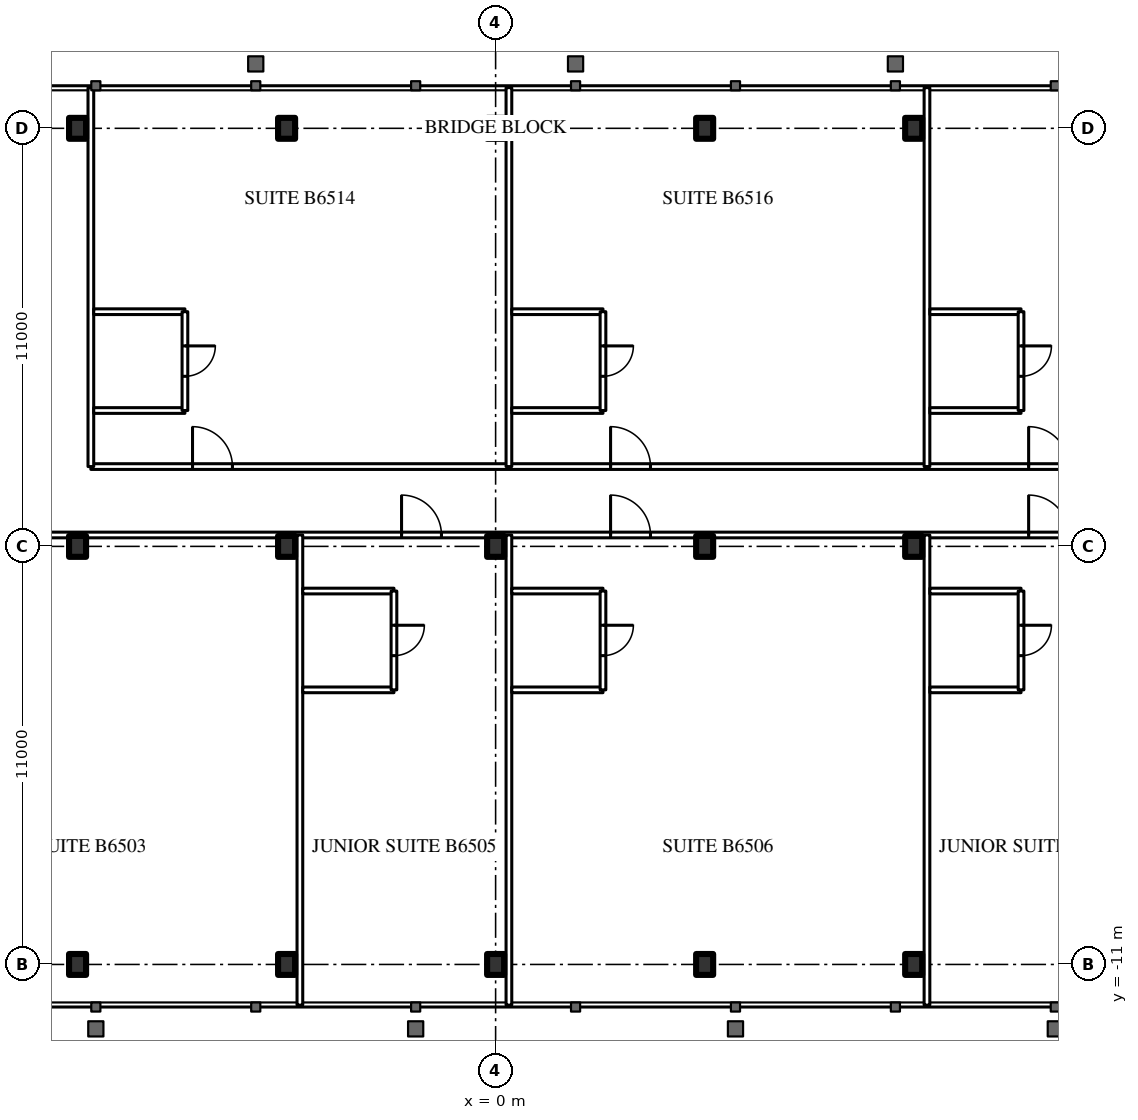
"""IFC4 building model, lengths in metres.
Left out: names, types, materials, properties, quantities, classifications, styles, units other than length and angle.
Written with IfcOpenShell. Run it as: python <this file> out.ifc"""

import sys

from ifc_helpers import new_model, si_unit, direction, frame, frame_2d, origin, origin_2d, place, context, subcontext, project, spatial, rectangle, i_section, extrude, element, fill, save


model = new_model("IFC4")
c1 = context("Model", 3, precision=1e-05, world=origin(), true_north=direction((0.0, 1.0)))
c2 = subcontext(c1, "Body", "Model", "MODEL_VIEW")
j1 = project(units=[si_unit("LENGTHUNIT", "METRE"), si_unit("PLANEANGLEUNIT", "RADIAN")], contexts=[c1])
p1 = place(None, origin())
s1 = spatial("IfcSite", under=j1, at=p1, CompositionType="ELEMENT")
p2 = place(p1, origin())
s2 = spatial("IfcBuilding", under=s1, at=p2, CompositionType="ELEMENT")
p3 = place(p2, frame((0.0, 0.0, 244.1)))
s3 = spatial("IfcBuildingStorey", under=s2, at=p3, CompositionType="ELEMENT", Elevation=244.1)
for number, where, z_axis, x_axis in (
    (1, (-11.0, -11.0, 0.0), (0.0, 0.0, 1.0), (1.0, 0.0, 0.0)),
    (2, (-5.5, -11.0, 0.0), (0.0, 0.0, 1.0), (1.0, 0.0, 0.0)),
    (3, (0.0, -11.0, 0.0), (0.0, 0.0, 1.0), (1.0, 0.0, 0.0)),
    (4, (5.5, -11.0, 0.0), (0.0, 0.0, 1.0), (1.0, 0.0, 0.0)),
    (5, (11.0, -11.0, 0.0), (0.0, 0.0, 1.0), (1.0, 0.0, 0.0)),
    (6, (-11.0, 0.0, 0.0), (0.0, 0.0, 1.0), (1.0, 0.0, 0.0)),
    (7, (-5.5, 0.0, 0.0), (0.0, 0.0, 1.0), (1.0, 0.0, 0.0)),
    (8, (0.0, 0.0, 0.0), (0.0, 0.0, 1.0), (1.0, 0.0, 0.0)),
    (9, (5.5, 0.0, 0.0), (0.0, 0.0, 1.0), (1.0, 0.0, 0.0)),
    (10, (11.0, 0.0, 0.0), (0.0, 0.0, 1.0), (1.0, 0.0, 0.0)),
    (11, (-11.0, 11.0, 0.0), (0.0, 0.0, 1.0), (1.0, 0.0, 0.0)),
    (12, (-5.5, 11.0, 0.0), (0.0, 0.0, 1.0), (1.0, 0.0, 0.0)),
    (13, (0.0, 11.0, 0.0), (0.0, 0.0, 1.0), (1.0, 0.0, 0.0)),
    (14, (5.5, 11.0, 0.0), (0.0, 0.0, 1.0), (1.0, 0.0, 0.0)),
    (15, (11.0, 11.0, 0.0), (0.0, 0.0, 1.0), (1.0, 0.0, 0.0)),
):
    element("IfcColumn", number, at=place(p3, frame(where, z_axis=z_axis, x_axis=x_axis)), inside=s3, PredefinedType="COLUMN", context=c2, shape_type="SweptSolid", body=[
        extrude(i_section(OverallWidth=0.448, OverallDepth=0.55, WebThickness=0.072, FlangeThickness=0.115, FilletRadius=0.02, at=origin_2d()), origin(), (0.0, 0.0, 1.0), 3.6),
    ])
p4 = place(p3, frame((-27.5, 0.3, 0.0), z_axis=(0.0, 0.0, 1.0), x_axis=(1.0, 0.0, 0.0)))
e16 = element("IfcWall", 16, at=p4, inside=s3, PredefinedType="PARTITIONING", context=c2, shape_type="SweptSolid", body=[
    extrude(rectangle(XDim=55.0, YDim=0.15, at=frame_2d((27.5, 0.0))), origin(), (0.0, 0.0, 1.0), 2.4),
])
p5 = place(p4, frame((1.575, 0.0, 0.0)))
e17 = element("IfcOpeningElement", 17, at=p5, cuts=e16, PredefinedType="OPENING", context=c2, shape_type="SweptSolid", body=[
    extrude(rectangle(XDim=1.0, YDim=2.2, at=frame_2d((0.5, 1.1))), frame((0.0, 0.085, 0.0), z_axis=(0.0, -1.0, 0.0), x_axis=(1.0, 0.0, 0.0)), (0.0, 0.0, 1.0), 0.17),
])
p6 = place(p4, frame((8.525, 0.0, 0.0)))
e18 = element("IfcOpeningElement", 18, at=p6, cuts=e16, PredefinedType="OPENING", context=c2, shape_type="SweptSolid", body=[
    extrude(rectangle(XDim=1.05, YDim=2.4, at=frame_2d((0.525, 1.2))), frame((0.0, 0.085, 0.0), z_axis=(0.0, -1.0, 0.0), x_axis=(1.0, 0.0, 0.0)), (0.0, 0.0, 1.0), 0.17),
])
p7 = place(p4, frame((14.025, 0.0, 0.0)))
e19 = element("IfcOpeningElement", 19, at=p7, cuts=e16, PredefinedType="OPENING", context=c2, shape_type="SweptSolid", body=[
    extrude(rectangle(XDim=1.05, YDim=2.4, at=frame_2d((0.525, 1.2))), frame((0.0, 0.085, 0.0), z_axis=(0.0, -1.0, 0.0), x_axis=(1.0, 0.0, 0.0)), (0.0, 0.0, 1.0), 0.17),
])
p8 = place(p4, frame((25.025, 0.0, 0.0)))
e20 = element("IfcOpeningElement", 20, at=p8, cuts=e16, PredefinedType="OPENING", context=c2, shape_type="SweptSolid", body=[
    extrude(rectangle(XDim=1.05, YDim=2.4, at=frame_2d((0.525, 1.2))), frame((0.0, 0.085, 0.0), z_axis=(0.0, -1.0, 0.0), x_axis=(1.0, 0.0, 0.0)), (0.0, 0.0, 1.0), 0.17),
])
p9 = place(p4, frame((30.525, 0.0, 0.0)))
e21 = element("IfcOpeningElement", 21, at=p9, cuts=e16, PredefinedType="OPENING", context=c2, shape_type="SweptSolid", body=[
    extrude(rectangle(XDim=1.05, YDim=2.4, at=frame_2d((0.525, 1.2))), frame((0.0, 0.085, 0.0), z_axis=(0.0, -1.0, 0.0), x_axis=(1.0, 0.0, 0.0)), (0.0, 0.0, 1.0), 0.17),
])
p10 = place(p4, frame((41.525, 0.0, 0.0)))
e22 = element("IfcOpeningElement", 22, at=p10, cuts=e16, PredefinedType="OPENING", context=c2, shape_type="SweptSolid", body=[
    extrude(rectangle(XDim=1.05, YDim=2.4, at=frame_2d((0.525, 1.2))), frame((0.0, 0.085, 0.0), z_axis=(0.0, -1.0, 0.0), x_axis=(1.0, 0.0, 0.0)), (0.0, 0.0, 1.0), 0.17),
])
p11 = place(p4, frame((47.025, 0.0, 0.0)))
e23 = element("IfcOpeningElement", 23, at=p11, cuts=e16, PredefinedType="OPENING", context=c2, shape_type="SweptSolid", body=[
    extrude(rectangle(XDim=1.05, YDim=2.4, at=frame_2d((0.525, 1.2))), frame((0.0, 0.085, 0.0), z_axis=(0.0, -1.0, 0.0), x_axis=(1.0, 0.0, 0.0)), (0.0, 0.0, 1.0), 0.17),
])
p12 = place(p4, frame((52.525, 0.0, 0.0)))
e24 = element("IfcOpeningElement", 24, at=p12, cuts=e16, PredefinedType="OPENING", context=c2, shape_type="SweptSolid", body=[
    extrude(rectangle(XDim=1.05, YDim=2.4, at=frame_2d((0.525, 1.2))), frame((0.0, 0.085, 0.0), z_axis=(0.0, -1.0, 0.0), x_axis=(1.0, 0.0, 0.0)), (0.0, 0.0, 1.0), 0.17),
])
p13 = place(p3, frame((-10.65, 2.1, 0.0), z_axis=(0.0, 0.0, 1.0), x_axis=(1.0, 0.0, 0.0)))
e25 = element("IfcWall", 25, at=p13, inside=s3, PredefinedType="PARTITIONING", context=c2, shape_type="SweptSolid", body=[
    extrude(rectangle(XDim=38.15, YDim=0.15, at=frame_2d((19.075, 0.0))), origin(), (0.0, 0.0, 1.0), 3.4),
])
p14 = place(p13, frame((2.675, 0.0, 0.0)))
e26 = element("IfcOpeningElement", 26, at=p14, cuts=e25, PredefinedType="OPENING", context=c2, shape_type="SweptSolid", body=[
    extrude(rectangle(XDim=1.05, YDim=2.4, at=frame_2d((0.525, 1.2))), frame((0.0, 0.085, 0.0), z_axis=(0.0, -1.0, 0.0), x_axis=(1.0, 0.0, 0.0)), (0.0, 0.0, 1.0), 0.17),
])
p15 = place(p13, frame((13.675, 0.0, 0.0)))
e27 = element("IfcOpeningElement", 27, at=p15, cuts=e25, PredefinedType="OPENING", context=c2, shape_type="SweptSolid", body=[
    extrude(rectangle(XDim=1.05, YDim=2.4, at=frame_2d((0.525, 1.2))), frame((0.0, 0.085, 0.0), z_axis=(0.0, -1.0, 0.0), x_axis=(1.0, 0.0, 0.0)), (0.0, 0.0, 1.0), 0.17),
])
p16 = place(p13, frame((24.675, 0.0, 0.0)))
e28 = element("IfcOpeningElement", 28, at=p16, cuts=e25, PredefinedType="OPENING", context=c2, shape_type="SweptSolid", body=[
    extrude(rectangle(XDim=1.05, YDim=2.4, at=frame_2d((0.525, 1.2))), frame((0.0, 0.085, 0.0), z_axis=(0.0, -1.0, 0.0), x_axis=(1.0, 0.0, 0.0)), (0.0, 0.0, 1.0), 0.17),
])
p17 = place(p13, frame((30.175, 0.0, 0.0)))
e29 = element("IfcOpeningElement", 29, at=p17, cuts=e25, PredefinedType="OPENING", context=c2, shape_type="SweptSolid", body=[
    extrude(rectangle(XDim=1.05, YDim=2.4, at=frame_2d((0.525, 1.2))), frame((0.0, 0.085, 0.0), z_axis=(0.0, -1.0, 0.0), x_axis=(1.0, 0.0, 0.0)), (0.0, 0.0, 1.0), 0.17),
])
p18 = place(p13, frame((35.675, 0.0, 0.0)))
e30 = element("IfcOpeningElement", 30, at=p18, cuts=e25, PredefinedType="OPENING", context=c2, shape_type="SweptSolid", body=[
    extrude(rectangle(XDim=1.05, YDim=2.4, at=frame_2d((0.525, 1.2))), frame((0.0, 0.085, 0.0), z_axis=(0.0, -1.0, 0.0), x_axis=(1.0, 0.0, 0.0)), (0.0, 0.0, 1.0), 0.17),
])
for number, where, z_axis, x_axis in (
    (31, (-5.15, -12.07, 0.0), (0.0, 0.0, 1.0), (0.0, 1.0, 0.0)),
    (32, (0.35, -12.07, 0.0), (0.0, 0.0, 1.0), (0.0, 1.0, 0.0)),
    (33, (11.35, -12.07, 0.0), (0.0, 0.0, 1.0), (0.0, 1.0, 0.0)),
):
    element("IfcWall", number, at=place(p3, frame(where, z_axis=z_axis, x_axis=x_axis)), inside=s3, PredefinedType="PARTITIONING", context=c2, shape_type="SweptSolid", body=[
        extrude(rectangle(XDim=12.37, YDim=0.15, at=frame_2d((6.185, 0.0))), origin(), (0.0, 0.0, 1.0), 3.4),
    ])
for number, where, z_axis, x_axis in (
    (34, (-5.075, -3.775, 0.0), (0.0, 0.0, 1.0), (1.0, 0.0, 0.0)),
    (35, (-5.075, -1.175, 0.0), (0.0, 0.0, 1.0), (1.0, 0.0, 0.0)),
):
    element("IfcWall", number, at=place(p3, frame(where, z_axis=z_axis, x_axis=x_axis)), inside=s3, PredefinedType="PARTITIONING", context=c2, shape_type="SweptSolid", body=[
        extrude(rectangle(XDim=2.4, YDim=0.15, at=frame_2d((1.2, 0.0))), origin(), (0.0, 0.0, 1.0), 3.4),
    ])
p19 = place(p3, frame((-2.675, -3.775, 0.0), z_axis=(0.0, 0.0, 1.0), x_axis=(0.0, 1.0, 0.0)))
e36 = element("IfcWall", 36, at=p19, inside=s3, PredefinedType="PARTITIONING", context=c2, shape_type="SweptSolid", body=[
    extrude(rectangle(XDim=2.6, YDim=0.15, at=frame_2d((1.3, 0.0))), origin(), (0.0, 0.0, 1.0), 3.4),
])
p20 = place(p19, frame((0.9, 0.0, 0.0)))
e37 = element("IfcOpeningElement", 37, at=p20, cuts=e36, PredefinedType="OPENING", context=c2, shape_type="SweptSolid", body=[
    extrude(rectangle(XDim=0.8, YDim=2.2, at=frame_2d((0.4, 1.1))), frame((0.0, 0.085, 0.0), z_axis=(0.0, -1.0, 0.0), x_axis=(1.0, 0.0, 0.0)), (0.0, 0.0, 1.0), 0.17),
])
for number, where, z_axis, x_axis in (
    (38, (0.425, -3.775, 0.0), (0.0, 0.0, 1.0), (1.0, 0.0, 0.0)),
    (39, (0.425, -1.175, 0.0), (0.0, 0.0, 1.0), (1.0, 0.0, 0.0)),
):
    element("IfcWall", number, at=place(p3, frame(where, z_axis=z_axis, x_axis=x_axis)), inside=s3, PredefinedType="PARTITIONING", context=c2, shape_type="SweptSolid", body=[
        extrude(rectangle(XDim=2.4, YDim=0.15, at=frame_2d((1.2, 0.0))), origin(), (0.0, 0.0, 1.0), 3.4),
    ])
p21 = place(p3, frame((2.825, -3.775, 0.0), z_axis=(0.0, 0.0, 1.0), x_axis=(0.0, 1.0, 0.0)))
e40 = element("IfcWall", 40, at=p21, inside=s3, PredefinedType="PARTITIONING", context=c2, shape_type="SweptSolid", body=[
    extrude(rectangle(XDim=2.6, YDim=0.15, at=frame_2d((1.3, 0.0))), origin(), (0.0, 0.0, 1.0), 3.4),
])
p22 = place(p21, frame((0.9, 0.0, 0.0)))
e41 = element("IfcOpeningElement", 41, at=p22, cuts=e40, PredefinedType="OPENING", context=c2, shape_type="SweptSolid", body=[
    extrude(rectangle(XDim=0.8, YDim=2.2, at=frame_2d((0.4, 1.1))), frame((0.0, 0.085, 0.0), z_axis=(0.0, -1.0, 0.0), x_axis=(1.0, 0.0, 0.0)), (0.0, 0.0, 1.0), 0.17),
])
for number, where, z_axis, x_axis in (
    (42, (11.425, -3.775, 0.0), (0.0, 0.0, 1.0), (1.0, 0.0, 0.0)),
    (43, (11.425, -1.175, 0.0), (0.0, 0.0, 1.0), (1.0, 0.0, 0.0)),
):
    element("IfcWall", number, at=place(p3, frame(where, z_axis=z_axis, x_axis=x_axis)), inside=s3, PredefinedType="PARTITIONING", context=c2, shape_type="SweptSolid", body=[
        extrude(rectangle(XDim=2.4, YDim=0.15, at=frame_2d((1.2, 0.0))), origin(), (0.0, 0.0, 1.0), 3.4),
    ])
p23 = place(p3, frame((13.825, -3.775, 0.0), z_axis=(0.0, 0.0, 1.0), x_axis=(0.0, 1.0, 0.0)))
e44 = element("IfcWall", 44, at=p23, inside=s3, PredefinedType="PARTITIONING", context=c2, shape_type="SweptSolid", body=[
    extrude(rectangle(XDim=2.6, YDim=0.15, at=frame_2d((1.3, 0.0))), origin(), (0.0, 0.0, 1.0), 3.4),
])
p24 = place(p23, frame((0.9, 0.0, 0.0)))
e45 = element("IfcOpeningElement", 45, at=p24, cuts=e44, PredefinedType="OPENING", context=c2, shape_type="SweptSolid", body=[
    extrude(rectangle(XDim=0.8, YDim=2.2, at=frame_2d((0.4, 1.1))), frame((0.0, 0.085, 0.0), z_axis=(0.0, -1.0, 0.0), x_axis=(1.0, 0.0, 0.0)), (0.0, 0.0, 1.0), 0.17),
])
for number, where, z_axis, x_axis in (
    (46, (-10.65, 2.1, 0.0), (0.0, 0.0, 1.0), (0.0, 1.0, 0.0)),
    (47, (0.35, 2.1, 0.0), (0.0, 0.0, 1.0), (0.0, 1.0, 0.0)),
    (48, (11.35, 2.1, 0.0), (0.0, 0.0, 1.0), (0.0, 1.0, 0.0)),
):
    element("IfcWall", number, at=place(p3, frame(where, z_axis=z_axis, x_axis=x_axis)), inside=s3, PredefinedType="PARTITIONING", context=c2, shape_type="SweptSolid", body=[
        extrude(rectangle(XDim=9.97, YDim=0.15, at=frame_2d((4.985, 0.0))), origin(), (0.0, 0.0, 1.0), 3.4),
    ])
for number, where, z_axis, x_axis in (
    (49, (-10.575, 6.175, 0.0), (0.0, 0.0, 1.0), (1.0, 0.0, 0.0)),
    (50, (-10.575, 3.575, 0.0), (0.0, 0.0, 1.0), (1.0, 0.0, 0.0)),
):
    element("IfcWall", number, at=place(p3, frame(where, z_axis=z_axis, x_axis=x_axis)), inside=s3, PredefinedType="PARTITIONING", context=c2, shape_type="SweptSolid", body=[
        extrude(rectangle(XDim=2.4, YDim=0.15, at=frame_2d((1.2, 0.0))), origin(), (0.0, 0.0, 1.0), 3.4),
    ])
p25 = place(p3, frame((-8.175, 3.575, 0.0), z_axis=(0.0, 0.0, 1.0), x_axis=(0.0, 1.0, 0.0)))
e51 = element("IfcWall", 51, at=p25, inside=s3, PredefinedType="PARTITIONING", context=c2, shape_type="SweptSolid", body=[
    extrude(rectangle(XDim=2.6, YDim=0.15, at=frame_2d((1.3, 0.0))), origin(), (0.0, 0.0, 1.0), 3.4),
])
p26 = place(p25, frame((0.9, 0.0, 0.0)))
e52 = element("IfcOpeningElement", 52, at=p26, cuts=e51, PredefinedType="OPENING", context=c2, shape_type="SweptSolid", body=[
    extrude(rectangle(XDim=0.8, YDim=2.2, at=frame_2d((0.4, 1.1))), frame((0.0, 0.085, 0.0), z_axis=(0.0, -1.0, 0.0), x_axis=(1.0, 0.0, 0.0)), (0.0, 0.0, 1.0), 0.17),
])
for number, where, z_axis, x_axis in (
    (53, (0.425, 6.175, 0.0), (0.0, 0.0, 1.0), (1.0, 0.0, 0.0)),
    (54, (0.425, 3.575, 0.0), (0.0, 0.0, 1.0), (1.0, 0.0, 0.0)),
):
    element("IfcWall", number, at=place(p3, frame(where, z_axis=z_axis, x_axis=x_axis)), inside=s3, PredefinedType="PARTITIONING", context=c2, shape_type="SweptSolid", body=[
        extrude(rectangle(XDim=2.4, YDim=0.15, at=frame_2d((1.2, 0.0))), origin(), (0.0, 0.0, 1.0), 3.4),
    ])
p27 = place(p3, frame((2.825, 3.575, 0.0), z_axis=(0.0, 0.0, 1.0), x_axis=(0.0, 1.0, 0.0)))
e55 = element("IfcWall", 55, at=p27, inside=s3, PredefinedType="PARTITIONING", context=c2, shape_type="SweptSolid", body=[
    extrude(rectangle(XDim=2.6, YDim=0.15, at=frame_2d((1.3, 0.0))), origin(), (0.0, 0.0, 1.0), 3.4),
])
p28 = place(p27, frame((0.9, 0.0, 0.0)))
e56 = element("IfcOpeningElement", 56, at=p28, cuts=e55, PredefinedType="OPENING", context=c2, shape_type="SweptSolid", body=[
    extrude(rectangle(XDim=0.8, YDim=2.2, at=frame_2d((0.4, 1.1))), frame((0.0, 0.085, 0.0), z_axis=(0.0, -1.0, 0.0), x_axis=(1.0, 0.0, 0.0)), (0.0, 0.0, 1.0), 0.17),
])
for number, where, z_axis, x_axis in (
    (57, (11.425, 6.175, 0.0), (0.0, 0.0, 1.0), (1.0, 0.0, 0.0)),
    (58, (11.425, 3.575, 0.0), (0.0, 0.0, 1.0), (1.0, 0.0, 0.0)),
):
    element("IfcWall", number, at=place(p3, frame(where, z_axis=z_axis, x_axis=x_axis)), inside=s3, PredefinedType="PARTITIONING", context=c2, shape_type="SweptSolid", body=[
        extrude(rectangle(XDim=2.4, YDim=0.15, at=frame_2d((1.2, 0.0))), origin(), (0.0, 0.0, 1.0), 3.4),
    ])
p29 = place(p3, frame((13.825, 3.575, 0.0), z_axis=(0.0, 0.0, 1.0), x_axis=(0.0, 1.0, 0.0)))
e59 = element("IfcWall", 59, at=p29, inside=s3, PredefinedType="PARTITIONING", context=c2, shape_type="SweptSolid", body=[
    extrude(rectangle(XDim=2.6, YDim=0.15, at=frame_2d((1.3, 0.0))), origin(), (0.0, 0.0, 1.0), 3.4),
])
p30 = place(p29, frame((0.9, 0.0, 0.0)))
e60 = element("IfcOpeningElement", 60, at=p30, cuts=e59, PredefinedType="OPENING", context=c2, shape_type="SweptSolid", body=[
    extrude(rectangle(XDim=0.8, YDim=2.2, at=frame_2d((0.4, 1.1))), frame((0.0, 0.085, 0.0), z_axis=(0.0, -1.0, 0.0), x_axis=(1.0, 0.0, 0.0)), (0.0, 0.0, 1.0), 0.17),
])
p31 = place(p20, origin())
e61 = element("IfcDoor", 61, at=p31, inside=s3, OperationType="SINGLE_SWING_RIGHT", PredefinedType="DOOR", context=c2, shape_type="SweptSolid", body=[
    extrude(rectangle(XDim=0.8, YDim=2.2, at=frame_2d((0.4, 1.1))), frame((0.0, 0.025, 0.0), z_axis=(0.0, -1.0, 0.0), x_axis=(1.0, 0.0, 0.0)), (0.0, 0.0, 1.0), 0.05),
])
fill(e37, e61)
p32 = place(p8, origin())
e62 = element("IfcDoor", 62, at=p32, inside=s3, OperationType="SINGLE_SWING_LEFT", PredefinedType="DOOR", context=c2, shape_type="SweptSolid", body=[
    extrude(rectangle(XDim=1.05, YDim=2.4, at=frame_2d((0.525, 1.2))), frame((0.0, 0.025, 0.0), z_axis=(0.0, -1.0, 0.0), x_axis=(1.0, 0.0, 0.0)), (0.0, 0.0, 1.0), 0.05),
])
fill(e20, e62)
p33 = place(p22, origin())
e63 = element("IfcDoor", 63, at=p33, inside=s3, OperationType="SINGLE_SWING_RIGHT", PredefinedType="DOOR", context=c2, shape_type="SweptSolid", body=[
    extrude(rectangle(XDim=0.8, YDim=2.2, at=frame_2d((0.4, 1.1))), frame((0.0, 0.025, 0.0), z_axis=(0.0, -1.0, 0.0), x_axis=(1.0, 0.0, 0.0)), (0.0, 0.0, 1.0), 0.05),
])
fill(e41, e63)
p34 = place(p9, origin())
e64 = element("IfcDoor", 64, at=p34, inside=s3, OperationType="SINGLE_SWING_LEFT", PredefinedType="DOOR", context=c2, shape_type="SweptSolid", body=[
    extrude(rectangle(XDim=1.05, YDim=2.4, at=frame_2d((0.525, 1.2))), frame((0.0, 0.025, 0.0), z_axis=(0.0, -1.0, 0.0), x_axis=(1.0, 0.0, 0.0)), (0.0, 0.0, 1.0), 0.05),
])
fill(e21, e64)
p35 = place(p24, origin())
e65 = element("IfcDoor", 65, at=p35, inside=s3, OperationType="SINGLE_SWING_RIGHT", PredefinedType="DOOR", context=c2, shape_type="SweptSolid", body=[
    extrude(rectangle(XDim=0.8, YDim=2.2, at=frame_2d((0.4, 1.1))), frame((0.0, 0.025, 0.0), z_axis=(0.0, -1.0, 0.0), x_axis=(1.0, 0.0, 0.0)), (0.0, 0.0, 1.0), 0.05),
])
fill(e45, e65)
p36 = place(p10, origin())
e66 = element("IfcDoor", 66, at=p36, inside=s3, OperationType="SINGLE_SWING_LEFT", PredefinedType="DOOR", context=c2, shape_type="SweptSolid", body=[
    extrude(rectangle(XDim=1.05, YDim=2.4, at=frame_2d((0.525, 1.2))), frame((0.0, 0.025, 0.0), z_axis=(0.0, -1.0, 0.0), x_axis=(1.0, 0.0, 0.0)), (0.0, 0.0, 1.0), 0.05),
])
fill(e22, e66)
p37 = place(p26, origin())
e67 = element("IfcDoor", 67, at=p37, inside=s3, OperationType="SINGLE_SWING_RIGHT", PredefinedType="DOOR", context=c2, shape_type="SweptSolid", body=[
    extrude(rectangle(XDim=0.8, YDim=2.2, at=frame_2d((0.4, 1.1))), frame((0.0, 0.025, 0.0), z_axis=(0.0, -1.0, 0.0), x_axis=(1.0, 0.0, 0.0)), (0.0, 0.0, 1.0), 0.05),
])
fill(e52, e67)
p38 = place(p14, origin())
e68 = element("IfcDoor", 68, at=p38, inside=s3, OperationType="SINGLE_SWING_LEFT", PredefinedType="DOOR", context=c2, shape_type="SweptSolid", body=[
    extrude(rectangle(XDim=1.05, YDim=2.4, at=frame_2d((0.525, 1.2))), frame((0.0, 0.025, 0.0), z_axis=(0.0, -1.0, 0.0), x_axis=(1.0, 0.0, 0.0)), (0.0, 0.0, 1.0), 0.05),
])
fill(e26, e68)
p39 = place(p28, origin())
e69 = element("IfcDoor", 69, at=p39, inside=s3, OperationType="SINGLE_SWING_RIGHT", PredefinedType="DOOR", context=c2, shape_type="SweptSolid", body=[
    extrude(rectangle(XDim=0.8, YDim=2.2, at=frame_2d((0.4, 1.1))), frame((0.0, 0.025, 0.0), z_axis=(0.0, -1.0, 0.0), x_axis=(1.0, 0.0, 0.0)), (0.0, 0.0, 1.0), 0.05),
])
fill(e56, e69)
p40 = place(p15, origin())
e70 = element("IfcDoor", 70, at=p40, inside=s3, OperationType="SINGLE_SWING_LEFT", PredefinedType="DOOR", context=c2, shape_type="SweptSolid", body=[
    extrude(rectangle(XDim=1.05, YDim=2.4, at=frame_2d((0.525, 1.2))), frame((0.0, 0.025, 0.0), z_axis=(0.0, -1.0, 0.0), x_axis=(1.0, 0.0, 0.0)), (0.0, 0.0, 1.0), 0.05),
])
fill(e27, e70)
p41 = place(p30, origin())
e71 = element("IfcDoor", 71, at=p41, inside=s3, OperationType="SINGLE_SWING_RIGHT", PredefinedType="DOOR", context=c2, shape_type="SweptSolid", body=[
    extrude(rectangle(XDim=0.8, YDim=2.2, at=frame_2d((0.4, 1.1))), frame((0.0, 0.025, 0.0), z_axis=(0.0, -1.0, 0.0), x_axis=(1.0, 0.0, 0.0)), (0.0, 0.0, 1.0), 0.05),
])
fill(e60, e71)
p42 = place(p16, origin())
e72 = element("IfcDoor", 72, at=p42, inside=s3, OperationType="SINGLE_SWING_LEFT", PredefinedType="DOOR", context=c2, shape_type="SweptSolid", body=[
    extrude(rectangle(XDim=1.05, YDim=2.4, at=frame_2d((0.525, 1.2))), frame((0.0, 0.025, 0.0), z_axis=(0.0, -1.0, 0.0), x_axis=(1.0, 0.0, 0.0)), (0.0, 0.0, 1.0), 0.05),
])
fill(e28, e72)
save(model, sys.argv[1])
